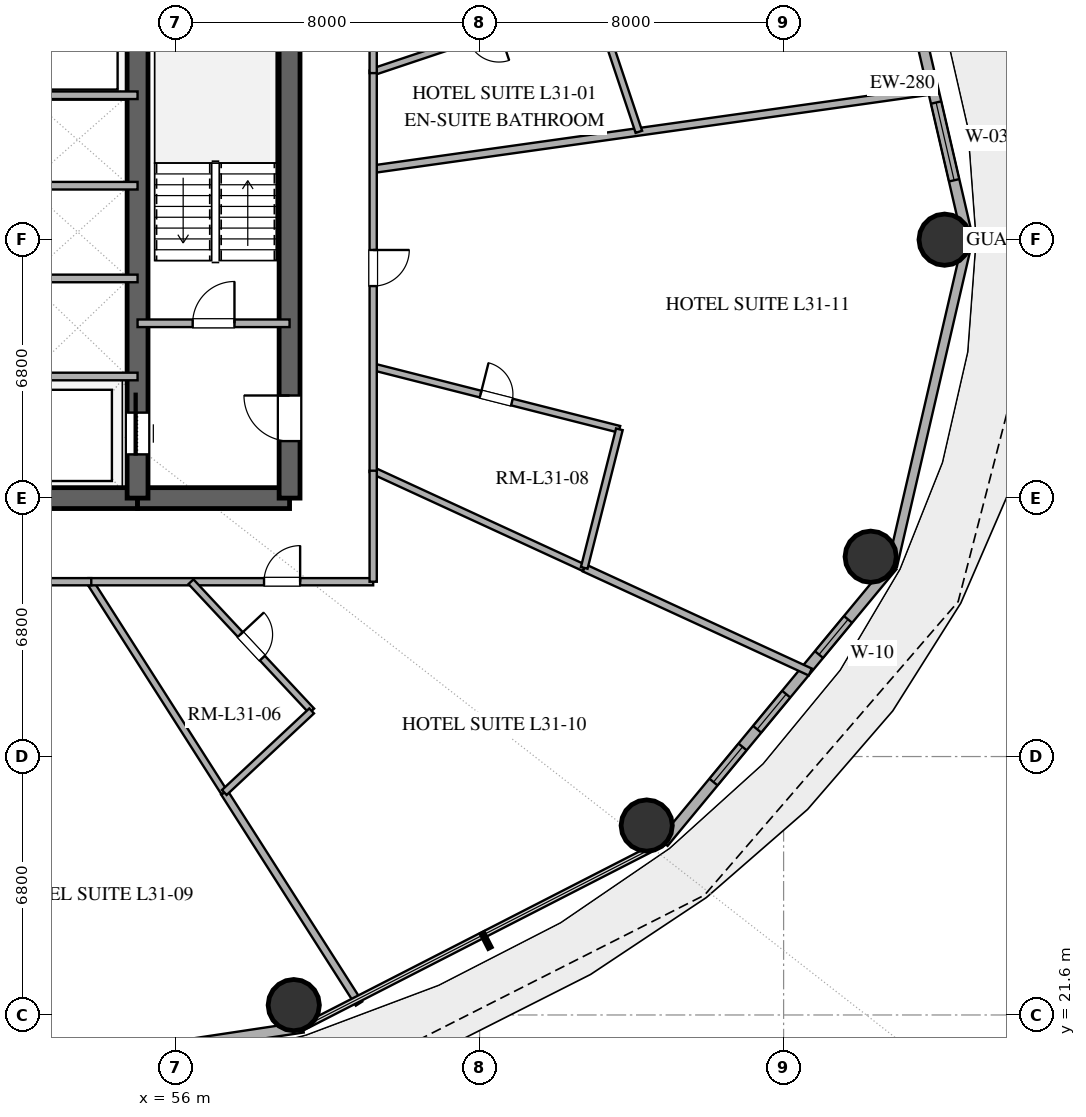
"""IFC4 building model, lengths in metres.
Left out: names, types, materials, properties, quantities, classifications, styles, units other than length and angle.
Written with IfcOpenShell. Run it as: python <this file> out.ifc"""

import sys

from ifc_helpers import new_model, si_unit, direction, frame, frame_2d, origin, origin_2d, place, context, subcontext, project, spatial, rectangle, hollow_circle, extrude, element, fill, save


model = new_model("IFC4")
c1 = context("Model", 3, precision=1e-05, world=origin(), true_north=direction((0.0, 1.0)))
c2 = subcontext(c1, "Body", "Model", "MODEL_VIEW")
j1 = project(units=[si_unit("LENGTHUNIT", "METRE"), si_unit("PLANEANGLEUNIT", "RADIAN")], contexts=[c1])
p1 = place(None, origin())
s1 = spatial("IfcSite", under=j1, at=p1, CompositionType="ELEMENT")
p2 = place(p1, origin())
s2 = spatial("IfcBuilding", under=s1, at=p2, CompositionType="ELEMENT")
p3 = place(p2, frame((0.0, 0.0, 123.6)))
s3 = spatial("IfcBuildingStorey", under=s2, at=p3, CompositionType="ELEMENT", Elevation=123.6)
p4 = place(p3, frame((41.0, 35.2, 0.0), z_axis=(0.0, 0.0, 1.0), x_axis=(1.0, 0.0, 0.0)))
e1 = element("IfcWall", 1, at=p4, inside=s3, PredefinedType="SHEAR", context=c2, shape_type="SweptSolid", body=[
    extrude(rectangle(XDim=14.0, YDim=0.55, at=frame_2d((7.0, 0.0))), origin(), (0.0, 0.0, 1.0), 3.38),
])
p5 = place(p4, frame((6.1, 0.0, 0.0)))
e2 = element("IfcOpeningElement", 2, at=p5, cuts=e1, PredefinedType="OPENING", context=c2, shape_type="SweptSolid", body=[
    extrude(rectangle(XDim=1.8, YDim=2.25, at=frame_2d((0.9, 1.125))), frame((0.0, 0.285, 0.0), z_axis=(0.0, -1.0, 0.0), x_axis=(1.0, 0.0, 0.0)), (0.0, 0.0, 1.0), 0.57),
])
p6 = place(p3, frame((55.0, 35.2, 0.0), z_axis=(0.0, 0.0, 1.0), x_axis=(1.0, 0.0, 0.0)))
e3 = element("IfcWall", 3, at=p6, inside=s3, PredefinedType="SHEAR", context=c2, shape_type="SweptSolid", body=[
    extrude(rectangle(XDim=4.0, YDim=0.55, at=frame_2d((2.0, 0.0))), origin(), (0.0, 0.0, 1.0), 3.38),
])
p7 = place(p3, frame((59.0, 35.2, 0.0), z_axis=(0.0, 0.0, 1.0), x_axis=(0.0, 1.0, 0.0)))
e4 = element("IfcWall", 4, at=p7, inside=s3, PredefinedType="SHEAR", context=c2, shape_type="SweptSolid", body=[
    extrude(rectangle(XDim=13.6, YDim=0.55, at=frame_2d((6.8, 0.0))), origin(), (0.0, 0.0, 1.0), 3.38),
])
p8 = place(p7, frame((1.5, 0.0, 0.0)))
e5 = element("IfcOpeningElement", 5, at=p8, cuts=e4, PredefinedType="OPENING", context=c2, shape_type="SweptSolid", body=[
    extrude(rectangle(XDim=1.2, YDim=2.15, at=frame_2d((0.6, 1.075))), frame((0.0, 0.285, 0.0), z_axis=(0.0, -1.0, 0.0), x_axis=(1.0, 0.0, 0.0)), (0.0, 0.0, 1.0), 0.57),
])
p9 = place(p3, frame((55.0, 35.2, 0.0), z_axis=(0.0, 0.0, 1.0), x_axis=(0.0, 1.0, 0.0)))
e6 = element("IfcWall", 6, at=p9, inside=s3, PredefinedType="SHEAR", context=c2, shape_type="SweptSolid", body=[
    extrude(rectangle(XDim=13.6, YDim=0.55, at=frame_2d((6.8, 0.0))), origin(), (0.0, 0.0, 1.0), 3.38),
])
p10 = place(p9, frame((1.15, 0.0, 0.0)))
e7 = element("IfcOpeningElement", 7, at=p10, cuts=e6, PredefinedType="OPENING", context=c2, shape_type="SweptSolid", body=[
    extrude(rectangle(XDim=1.1, YDim=2.2, at=frame_2d((0.55, 1.1))), frame((0.0, 0.285, 0.0), z_axis=(0.0, -1.0, 0.0), x_axis=(1.0, 0.0, 0.0)), (0.0, 0.0, 1.0), 0.57),
])
for number, where, z_axis, x_axis in (
    (8, (76.237, 42.0, 0.0), (0.0, 0.0, 1.0), (1.0, 0.0, 0.0)),
    (9, (59.11, 21.859, 0.0), (0.0, 0.0, 1.0), (1.0, 0.0, 0.0)),
    (10, (68.398, 26.585, 0.0), (0.0, 0.0, 1.0), (1.0, 0.0, 0.0)),
    (11, (74.291, 33.657, 0.0), (0.0, 0.0, 1.0), (1.0, 0.0, 0.0)),
):
    element("IfcColumn", number, at=place(p3, frame(where, z_axis=z_axis, x_axis=x_axis)), inside=s3, PredefinedType="COLUMN", context=c2, shape_type="SweptSolid", body=[
        extrude(hollow_circle(Radius=0.675, WallThickness=0.036, at=origin_2d()), origin(), (0.0, 0.0, 1.0), 3.38),
    ])
p11 = place(p3, frame((76.849, 42.0, 0.0), z_axis=(0.0, 0.0, 1.0), x_axis=(-0.22558597182, 0.974223264616, 0.0)))
e12 = element("IfcWall", 12, at=p11, inside=s3, PredefinedType="SOLIDWALL", context=c2, shape_type="SweptSolid", body=[
    extrude(rectangle(XDim=8.811, YDim=0.28, at=frame_2d((4.405, 0.0))), origin(), (0.0, 0.0, 1.0), 3.38),
])
p12 = place(p11, frame((1.604, 0.0, 0.85)))
e13 = element("IfcOpeningElement", 13, at=p12, cuts=e12, PredefinedType="OPENING", context=c2, shape_type="SweptSolid", body=[
    extrude(rectangle(XDim=2.1, YDim=2.2, at=frame_2d((1.05, 1.1))), frame((0.0, 0.15, 0.0), z_axis=(0.0, -1.0, 0.0), x_axis=(1.0, 0.0, 0.0)), (0.0, 0.0, 1.0), 0.3),
])
p13 = place(p11, frame((6.225, 0.0, 0.0)))
e14 = element("IfcOpeningElement", 14, at=p13, cuts=e12, PredefinedType="OPENING", context=c2, shape_type="SweptSolid", body=[
    extrude(rectangle(XDim=1.05, YDim=2.2, at=frame_2d((0.525, 1.1))), frame((0.0, 0.15, 0.0), z_axis=(0.0, -1.0, 0.0), x_axis=(1.0, 0.0, 0.0)), (0.0, 0.0, 1.0), 0.3),
])
p14 = place(p3, frame((48.0, 19.57, 0.0), z_axis=(0.0, 0.0, 1.0), x_axis=(0.988877774656, 0.148730450117, 0.0)))
e15 = element("IfcWall", 15, at=p14, inside=s3, PredefinedType="SOLIDWALL", context=c2, shape_type="SweptSolid", body=[
    extrude(rectangle(XDim=11.479, YDim=0.28, at=frame_2d((5.74, 0.0))), origin(), (0.0, 0.0, 1.0), 3.38),
])
p15 = place(p14, frame((1.524, 0.0, 0.0)))
e16 = element("IfcOpeningElement", 16, at=p15, cuts=e15, PredefinedType="OPENING", context=c2, shape_type="SweptSolid", body=[
    extrude(rectangle(XDim=1.1, YDim=2.25, at=frame_2d((0.55, 1.125))), frame((0.0, 0.15, 0.0), z_axis=(0.0, -1.0, 0.0), x_axis=(1.0, 0.0, 0.0)), (0.0, 0.0, 1.0), 0.3),
])
p16 = place(p3, frame((68.84, 26.14, 0.0), z_axis=(0.0, 0.0, 1.0), x_axis=(0.637505817448, 0.770445541696, 0.0)))
e17 = element("IfcWall", 17, at=p16, inside=s3, PredefinedType="SOLIDWALL", context=c2, shape_type="SweptSolid", body=[
    extrude(rectangle(XDim=9.445, YDim=0.28, at=frame_2d((4.723, 0.0))), origin(), (0.0, 0.0, 1.0), 3.38),
])
p17 = place(p16, frame((2.063, 0.0, 0.85)))
e18 = element("IfcOpeningElement", 18, at=p17, cuts=e17, PredefinedType="OPENING", context=c2, shape_type="SweptSolid", body=[
    extrude(rectangle(XDim=1.2, YDim=1.8, at=frame_2d((0.6, 0.9))), frame((0.0, 0.15, 0.0), z_axis=(0.0, -1.0, 0.0), x_axis=(1.0, 0.0, 0.0)), (0.0, 0.0, 1.0), 0.3),
])
p18 = place(p16, frame((3.865, 0.0, 0.85)))
e19 = element("IfcOpeningElement", 19, at=p18, cuts=e17, PredefinedType="OPENING", context=c2, shape_type="SweptSolid", body=[
    extrude(rectangle(XDim=1.2, YDim=1.8, at=frame_2d((0.6, 0.9))), frame((0.0, 0.15, 0.0), z_axis=(0.0, -1.0, 0.0), x_axis=(1.0, 0.0, 0.0)), (0.0, 0.0, 1.0), 0.3),
])
p19 = place(p16, frame((6.417, 0.0, 0.85)))
e20 = element("IfcOpeningElement", 20, at=p19, cuts=e17, PredefinedType="OPENING", context=c2, shape_type="SweptSolid", body=[
    extrude(rectangle(XDim=1.2, YDim=1.6, at=frame_2d((0.6, 0.8))), frame((0.0, 0.15, 0.0), z_axis=(0.0, -1.0, 0.0), x_axis=(1.0, 0.0, 0.0)), (0.0, 0.0, 1.0), 0.3),
])
p20 = place(p3, frame((74.861, 33.417, 0.0), z_axis=(0.0, 0.0, 1.0), x_axis=(0.22558597182, 0.974223264616, 0.0)))
e21 = element("IfcWall", 21, at=p20, inside=s3, PredefinedType="SOLIDWALL", context=c2, shape_type="SweptSolid", body=[
    extrude(rectangle(XDim=8.811, YDim=0.25, at=frame_2d((4.405, 0.0))), origin(), (0.0, 0.0, 1.0), 3.38),
])
p21 = place(p3, frame((55.0, 39.8, 0.0), z_axis=(0.0, 0.0, 1.0), x_axis=(1.0, 0.0, 0.0)))
e22 = element("IfcWall", 22, at=p21, inside=s3, PredefinedType="SOLIDWALL", context=c2, shape_type="SweptSolid", body=[
    extrude(rectangle(XDim=4.0, YDim=0.2, at=frame_2d((2.0, 0.0))), origin(), (0.0, 0.0, 1.0), 2.74),
])
p22 = place(p21, frame((1.45, 0.0, 0.0)))
e23 = element("IfcOpeningElement", 23, at=p22, cuts=e22, PredefinedType="OPENING", context=c2, shape_type="SweptSolid", body=[
    extrude(rectangle(XDim=1.1, YDim=2.15, at=frame_2d((0.55, 1.075))), frame((0.0, 0.11, 0.0), z_axis=(0.0, -1.0, 0.0), x_axis=(1.0, 0.0, 0.0)), (0.0, 0.0, 1.0), 0.22),
])
for number, where, z_axis, x_axis in (
    (24, (52.05, 38.4, 0.0), (0.0, 0.0, 1.0), (1.0, 0.0, 0.0)),
    (25, (52.05, 40.98, 0.0), (0.0, 0.0, 1.0), (1.0, 0.0, 0.0)),
    (26, (52.05, 43.42, 0.0), (0.0, 0.0, 1.0), (1.0, 0.0, 0.0)),
    (27, (52.05, 45.8, 0.0), (0.0, 0.0, 1.0), (1.0, 0.0, 0.0)),
):
    element("IfcWall", number, at=place(p3, frame(where, z_axis=z_axis, x_axis=x_axis)), inside=s3, PredefinedType="SOLIDWALL", context=c2, shape_type="SweptSolid", body=[
        extrude(rectangle(XDim=2.95, YDim=0.2, at=frame_2d((1.475, 0.0))), origin(), (0.0, 0.0, 1.0), 2.74),
    ])
p23 = place(p3, frame((61.2, 43.855, 0.0), z_axis=(0.0, 0.0, 1.0), x_axis=(0.990266848234, 0.139181785048, 0.0)))
e28 = element("IfcWall", 28, at=p23, inside=s3, PredefinedType="PARTITIONING", context=c2, shape_type="SweptSolid", body=[
    extrude(rectangle(XDim=15.005, YDim=0.2, at=frame_2d((7.502, 0.0))), origin(), (0.0, 0.0, 1.0), 2.74),
])
p24 = place(p3, frame((61.2, 38.653, 0.0), z_axis=(0.0, 0.0, 1.0), x_axis=(0.96932048276, -0.24580032893, 0.0)))
e29 = element("IfcWall", 29, at=p24, inside=s3, PredefinedType="PLUMBINGWALL", context=c2, shape_type="SweptSolid", body=[
    extrude(rectangle(XDim=6.684, YDim=0.18, at=frame_2d((3.342, 0.0))), origin(), (0.0, 0.0, 1.0), 2.74),
])
p25 = place(p24, frame((2.917, 0.0, 0.0)))
e30 = element("IfcOpeningElement", 30, at=p25, cuts=e29, PredefinedType="OPENING", context=c2, shape_type="SweptSolid", body=[
    extrude(rectangle(XDim=0.85, YDim=2.1, at=frame_2d((0.425, 1.05))), frame((0.0, 0.1, 0.0), z_axis=(0.0, -1.0, 0.0), x_axis=(1.0, 0.0, 0.0)), (0.0, 0.0, 1.0), 0.2),
])
p26 = place(p3, frame((60.828, 21.9, 0.0), z_axis=(0.0, 0.0, 1.0), x_axis=(-0.537968238966, 0.842965108331, 0.0)))
e31 = element("IfcWall", 31, at=p26, inside=s3, PredefinedType="PARTITIONING", context=c2, shape_type="SweptSolid", body=[
    extrude(rectangle(XDim=6.589, YDim=0.2, at=frame_2d((3.295, 0.0))), origin(), (0.0, 0.0, 1.0), 2.74),
])
p27 = place(p3, frame((57.283, 27.454, 0.0), z_axis=(0.0, 0.0, 1.0), x_axis=(-0.537984400251, 0.842954794213, 0.0)))
e32 = element("IfcWall", 32, at=p27, inside=s3, PredefinedType="PLUMBINGWALL", context=c2, shape_type="SweptSolid", body=[
    extrude(rectangle(XDim=6.579, YDim=0.18, at=frame_2d((3.29, 0.0))), origin(), (0.0, 0.0, 1.0), 2.74),
])
p28 = place(p3, frame((72.701, 30.624, 0.0), z_axis=(0.0, 0.0, 1.0), x_axis=(-0.9083071886, 0.418303778536, 0.0)))
e33 = element("IfcWall", 33, at=p28, inside=s3, PredefinedType="PARTITIONING", context=c2, shape_type="SweptSolid", body=[
    extrude(rectangle(XDim=6.548, YDim=0.2, at=frame_2d((3.274, 0.0))), origin(), (0.0, 0.0, 1.0), 2.74),
])
p29 = place(p3, frame((67.012, 48.361, 0.0), z_axis=(0.0, 0.0, 1.0), x_axis=(-0.948332174456, -0.317279193915, 0.0)))
e34 = element("IfcWall", 34, at=p29, inside=s3, PredefinedType="PLUMBINGWALL", context=c2, shape_type="SweptSolid", body=[
    extrude(rectangle(XDim=6.129, YDim=0.18, at=frame_2d((3.064, 0.0))), origin(), (0.0, 0.0, 1.0), 2.74),
])
p30 = place(p29, frame((2.639, 0.0, 0.0)))
e35 = element("IfcOpeningElement", 35, at=p30, cuts=e34, PredefinedType="OPENING", context=c2, shape_type="SweptSolid", body=[
    extrude(rectangle(XDim=0.85, YDim=2.1, at=frame_2d((0.425, 1.05))), frame((0.0, 0.1, 0.0), z_axis=(0.0, -1.0, 0.0), x_axis=(1.0, 0.0, 0.0)), (0.0, 0.0, 1.0), 0.2),
])
p31 = place(p3, frame((66.754, 33.363, 0.0), z_axis=(0.0, 0.0, 1.0), x_axis=(-0.908301480607, 0.418316172681, 0.0)))
e36 = element("IfcWall", 36, at=p31, inside=s3, PredefinedType="PLUMBINGWALL", context=c2, shape_type="SweptSolid", body=[
    extrude(rectangle(XDim=6.115, YDim=0.18, at=frame_2d((3.057, 0.0))), origin(), (0.0, 0.0, 1.0), 2.74),
])
p32 = place(p3, frame((61.2, 46.45, 0.0), z_axis=(0.0, 0.0, 1.0), x_axis=(0.0, -1.0, 0.0)))
e37 = element("IfcWall", 37, at=p32, inside=s3, PredefinedType="PARTITIONING", context=c2, shape_type="SweptSolid", body=[
    extrude(rectangle(XDim=10.564, YDim=0.19, at=frame_2d((5.282, 0.0))), origin(), (0.0, 0.0, 1.0), 2.74),
])
p33 = place(p32, frame((4.722, 0.0, 0.0)))
e38 = element("IfcOpeningElement", 38, at=p33, cuts=e37, PredefinedType="OPENING", context=c2, shape_type="SweptSolid", body=[
    extrude(rectangle(XDim=0.95, YDim=2.15, at=frame_2d((0.475, 1.075))), frame((0.0, 0.105, 0.0), z_axis=(0.0, -1.0, 0.0), x_axis=(1.0, 0.0, 0.0)), (0.0, 0.0, 1.0), 0.21),
])
p34 = place(p3, frame((53.706, 33.0, 0.0), z_axis=(0.0, 0.0, 1.0), x_axis=(1.0, 0.0, 0.0)))
e39 = element("IfcWall", 39, at=p34, inside=s3, PredefinedType="PARTITIONING", context=c2, shape_type="SweptSolid", body=[
    extrude(rectangle(XDim=7.494, YDim=0.19, at=frame_2d((3.747, 0.0))), origin(), (0.0, 0.0, 1.0), 2.74),
])
p35 = place(p34, frame((4.622, 0.0, 0.0)))
e40 = element("IfcOpeningElement", 40, at=p35, cuts=e39, PredefinedType="OPENING", context=c2, shape_type="SweptSolid", body=[
    extrude(rectangle(XDim=0.95, YDim=2.15, at=frame_2d((0.475, 1.075))), frame((0.0, 0.105, 0.0), z_axis=(0.0, -1.0, 0.0), x_axis=(1.0, 0.0, 0.0)), (0.0, 0.0, 1.0), 0.21),
])
p36 = place(p3, frame((56.406, 33.0, 0.0), z_axis=(0.0, 0.0, 1.0), x_axis=(0.682578142961, -0.730812615348, 0.0)))
e41 = element("IfcWall", 41, at=p36, inside=s3, PredefinedType="PLUMBINGWALL", context=c2, shape_type="SweptSolid", body=[
    extrude(rectangle(XDim=4.652, YDim=0.18, at=frame_2d((2.326, 0.0))), origin(), (0.0, 0.0, 1.0), 2.74),
])
p37 = place(p36, frame((1.901, 0.0, 0.0)))
e42 = element("IfcOpeningElement", 42, at=p37, cuts=e41, PredefinedType="OPENING", context=c2, shape_type="SweptSolid", body=[
    extrude(rectangle(XDim=0.85, YDim=2.1, at=frame_2d((0.425, 1.05))), frame((0.0, 0.1, 0.0), z_axis=(0.0, -1.0, 0.0), x_axis=(1.0, 0.0, 0.0)), (0.0, 0.0, 1.0), 0.2),
])
p38 = place(p3, frame((61.2, 51.0, 0.0), z_axis=(0.0, 0.0, 1.0), x_axis=(0.0, -1.0, 0.0)))
e43 = element("IfcWall", 43, at=p38, inside=s3, PredefinedType="PARTITIONING", context=c2, shape_type="SweptSolid", body=[
    extrude(rectangle(XDim=4.617, YDim=0.19, at=frame_2d((2.309, 0.0))), origin(), (0.0, 0.0, 1.0), 2.74),
])
p39 = place(p38, frame((1.833, 0.0, 0.0)))
e44 = element("IfcOpeningElement", 44, at=p39, cuts=e43, PredefinedType="OPENING", context=c2, shape_type="SweptSolid", body=[
    extrude(rectangle(XDim=0.95, YDim=2.15, at=frame_2d((0.475, 1.075))), frame((0.0, 0.105, 0.0), z_axis=(0.0, -1.0, 0.0), x_axis=(1.0, 0.0, 0.0)), (0.0, 0.0, 1.0), 0.21),
])
p40 = place(p3, frame((53.782, 33.0, 0.0), z_axis=(0.0, 0.0, 1.0), x_axis=(-1.0, 0.0, 0.0)))
e45 = element("IfcWall", 45, at=p40, inside=s3, PredefinedType="PARTITIONING", context=c2, shape_type="SweptSolid", body=[
    extrude(rectangle(XDim=4.176, YDim=0.19, at=frame_2d((2.088, 0.0))), origin(), (0.0, 0.0, 1.0), 2.74),
])
p41 = place(p40, frame((1.613, 0.0, 0.0)))
e46 = element("IfcOpeningElement", 46, at=p41, cuts=e45, PredefinedType="OPENING", context=c2, shape_type="SweptSolid", body=[
    extrude(rectangle(XDim=0.95, YDim=2.15, at=frame_2d((0.475, 1.075))), frame((0.0, 0.105, 0.0), z_axis=(0.0, -1.0, 0.0), x_axis=(1.0, 0.0, 0.0)), (0.0, 0.0, 1.0), 0.21),
])
p42 = place(p3, frame((67.678, 37.01, 0.0), z_axis=(0.0, 0.0, 1.0), x_axis=(-0.245725202551, -0.969339530212, 0.0)))
e47 = element("IfcWall", 47, at=p42, inside=s3, PredefinedType="PLUMBINGWALL", context=c2, shape_type="SweptSolid", body=[
    extrude(rectangle(XDim=3.763, YDim=0.18, at=frame_2d((1.881, 0.0))), origin(), (0.0, 0.0, 1.0), 2.74),
])
p43 = place(p3, frame((68.191, 44.838, 0.0), z_axis=(0.0, 0.0, 1.0), x_axis=(-0.317291996527, 0.948327891048, 0.0)))
e48 = element("IfcWall", 48, at=p43, inside=s3, PredefinedType="PLUMBINGWALL", context=c2, shape_type="SweptSolid", body=[
    extrude(rectangle(XDim=3.716, YDim=0.18, at=frame_2d((1.858, 0.0))), origin(), (0.0, 0.0, 1.0), 2.74),
])
p44 = place(p3, frame((59.581, 29.601, 0.0), z_axis=(0.0, 0.0, 1.0), x_axis=(-0.730840933831, -0.682547822088, 0.0)))
e49 = element("IfcWall", 49, at=p44, inside=s3, PredefinedType="PLUMBINGWALL", context=c2, shape_type="SweptSolid", body=[
    extrude(rectangle(XDim=3.145, YDim=0.18, at=frame_2d((1.572, 0.0))), origin(), (0.0, 0.0, 1.0), 2.74),
])
p45 = place(p3, frame((61.2, 33.0, 0.0), z_axis=(0.0, 0.0, 1.0), x_axis=(0.0, 1.0, 0.0)))
e50 = element("IfcWall", 50, at=p45, inside=s3, PredefinedType="PARTITIONING", context=c2, shape_type="SweptSolid", body=[
    extrude(rectangle(XDim=2.921, YDim=0.19, at=frame_2d((1.46, 0.0))), origin(), (0.0, 0.0, 1.0), 2.74),
])
p46 = place(p12, origin())
e51 = element("IfcWindow", 51, at=p46, inside=s3, PartitioningType="SINGLE_PANEL", PredefinedType="WINDOW", context=c2, shape_type="SweptSolid", body=[
    extrude(rectangle(XDim=2.1, YDim=2.2, at=frame_2d((1.05, 1.1))), frame((0.0, 0.03, 0.0), z_axis=(0.0, -1.0, 0.0), x_axis=(1.0, 0.0, 0.0)), (0.0, 0.0, 1.0), 0.06),
])
fill(e13, e51)
p47 = place(p17, origin())
e52 = element("IfcWindow", 52, at=p47, inside=s3, PartitioningType="SINGLE_PANEL", PredefinedType="WINDOW", context=c2, shape_type="SweptSolid", body=[
    extrude(rectangle(XDim=1.2, YDim=1.8, at=frame_2d((0.6, 0.9))), frame((0.0, 0.03, 0.0), z_axis=(0.0, -1.0, 0.0), x_axis=(1.0, 0.0, 0.0)), (0.0, 0.0, 1.0), 0.06),
])
fill(e18, e52)
p48 = place(p18, origin())
e53 = element("IfcWindow", 53, at=p48, inside=s3, PartitioningType="SINGLE_PANEL", PredefinedType="WINDOW", context=c2, shape_type="SweptSolid", body=[
    extrude(rectangle(XDim=1.2, YDim=1.8, at=frame_2d((0.6, 0.9))), frame((0.0, 0.03, 0.0), z_axis=(0.0, -1.0, 0.0), x_axis=(1.0, 0.0, 0.0)), (0.0, 0.0, 1.0), 0.06),
])
fill(e19, e53)
p49 = place(p19, origin())
e54 = element("IfcWindow", 54, at=p49, inside=s3, PartitioningType="SINGLE_PANEL", PredefinedType="WINDOW", context=c2, shape_type="SweptSolid", body=[
    extrude(rectangle(XDim=1.2, YDim=1.6, at=frame_2d((0.6, 0.8))), frame((0.0, 0.03, 0.0), z_axis=(0.0, -1.0, 0.0), x_axis=(1.0, 0.0, 0.0)), (0.0, 0.0, 1.0), 0.06),
])
fill(e20, e54)
p50 = place(p10, origin())
e55 = element("IfcDoor", 55, at=p50, inside=s3, OperationType="SLIDING_TO_RIGHT", PredefinedType="DOOR", context=c2, shape_type="SweptSolid", body=[
    extrude(rectangle(XDim=1.1, YDim=2.2, at=frame_2d((0.55, 1.1))), frame((0.0, 0.025, 0.0), z_axis=(0.0, -1.0, 0.0), x_axis=(1.0, 0.0, 0.0)), (0.0, 0.0, 1.0), 0.05),
])
fill(e7, e55)
p51 = place(p8, origin())
e56 = element("IfcDoor", 56, at=p51, inside=s3, OperationType="SINGLE_SWING_RIGHT", PredefinedType="DOOR", context=c2, shape_type="SweptSolid", body=[
    extrude(rectangle(XDim=1.2, YDim=2.15, at=frame_2d((0.6, 1.075))), frame((0.0, 0.025, 0.0), z_axis=(0.0, -1.0, 0.0), x_axis=(1.0, 0.0, 0.0)), (0.0, 0.0, 1.0), 0.05),
])
fill(e5, e56)
p52 = place(p22, origin())
e57 = element("IfcDoor", 57, at=p52, inside=s3, OperationType="SINGLE_SWING_RIGHT", PredefinedType="DOOR", context=c2, shape_type="SweptSolid", body=[
    extrude(rectangle(XDim=1.1, YDim=2.15, at=frame_2d((0.55, 1.075))), frame((0.0, 0.025, 0.0), z_axis=(0.0, -1.0, 0.0), x_axis=(1.0, 0.0, 0.0)), (0.0, 0.0, 1.0), 0.05),
])
fill(e23, e57)
p53 = place(p25, origin())
e58 = element("IfcDoor", 58, at=p53, inside=s3, OperationType="SINGLE_SWING_LEFT", PredefinedType="DOOR", context=c2, shape_type="SweptSolid", body=[
    extrude(rectangle(XDim=0.85, YDim=2.1, at=frame_2d((0.425, 1.05))), frame((0.0, 0.025, 0.0), z_axis=(0.0, -1.0, 0.0), x_axis=(1.0, 0.0, 0.0)), (0.0, 0.0, 1.0), 0.05),
])
fill(e30, e58)
p54 = place(p33, origin())
e59 = element("IfcDoor", 59, at=p54, inside=s3, OperationType="SINGLE_SWING_LEFT", PredefinedType="DOOR", context=c2, shape_type="SweptSolid", body=[
    extrude(rectangle(XDim=0.95, YDim=2.15, at=frame_2d((0.475, 1.075))), frame((0.0, 0.025, 0.0), z_axis=(0.0, -1.0, 0.0), x_axis=(1.0, 0.0, 0.0)), (0.0, 0.0, 1.0), 0.05),
])
fill(e38, e59)
p55 = place(p35, origin())
e60 = element("IfcDoor", 60, at=p55, inside=s3, OperationType="SINGLE_SWING_RIGHT", PredefinedType="DOOR", context=c2, shape_type="SweptSolid", body=[
    extrude(rectangle(XDim=0.95, YDim=2.15, at=frame_2d((0.475, 1.075))), frame((0.0, 0.025, 0.0), z_axis=(0.0, -1.0, 0.0), x_axis=(1.0, 0.0, 0.0)), (0.0, 0.0, 1.0), 0.05),
])
fill(e40, e60)
p56 = place(p37, origin())
e61 = element("IfcDoor", 61, at=p56, inside=s3, OperationType="SINGLE_SWING_LEFT", PredefinedType="DOOR", context=c2, shape_type="SweptSolid", body=[
    extrude(rectangle(XDim=0.85, YDim=2.1, at=frame_2d((0.425, 1.05))), frame((0.0, 0.025, 0.0), z_axis=(0.0, -1.0, 0.0), x_axis=(1.0, 0.0, 0.0)), (0.0, 0.0, 1.0), 0.05),
])
fill(e42, e61)
save(model, sys.argv[1])
